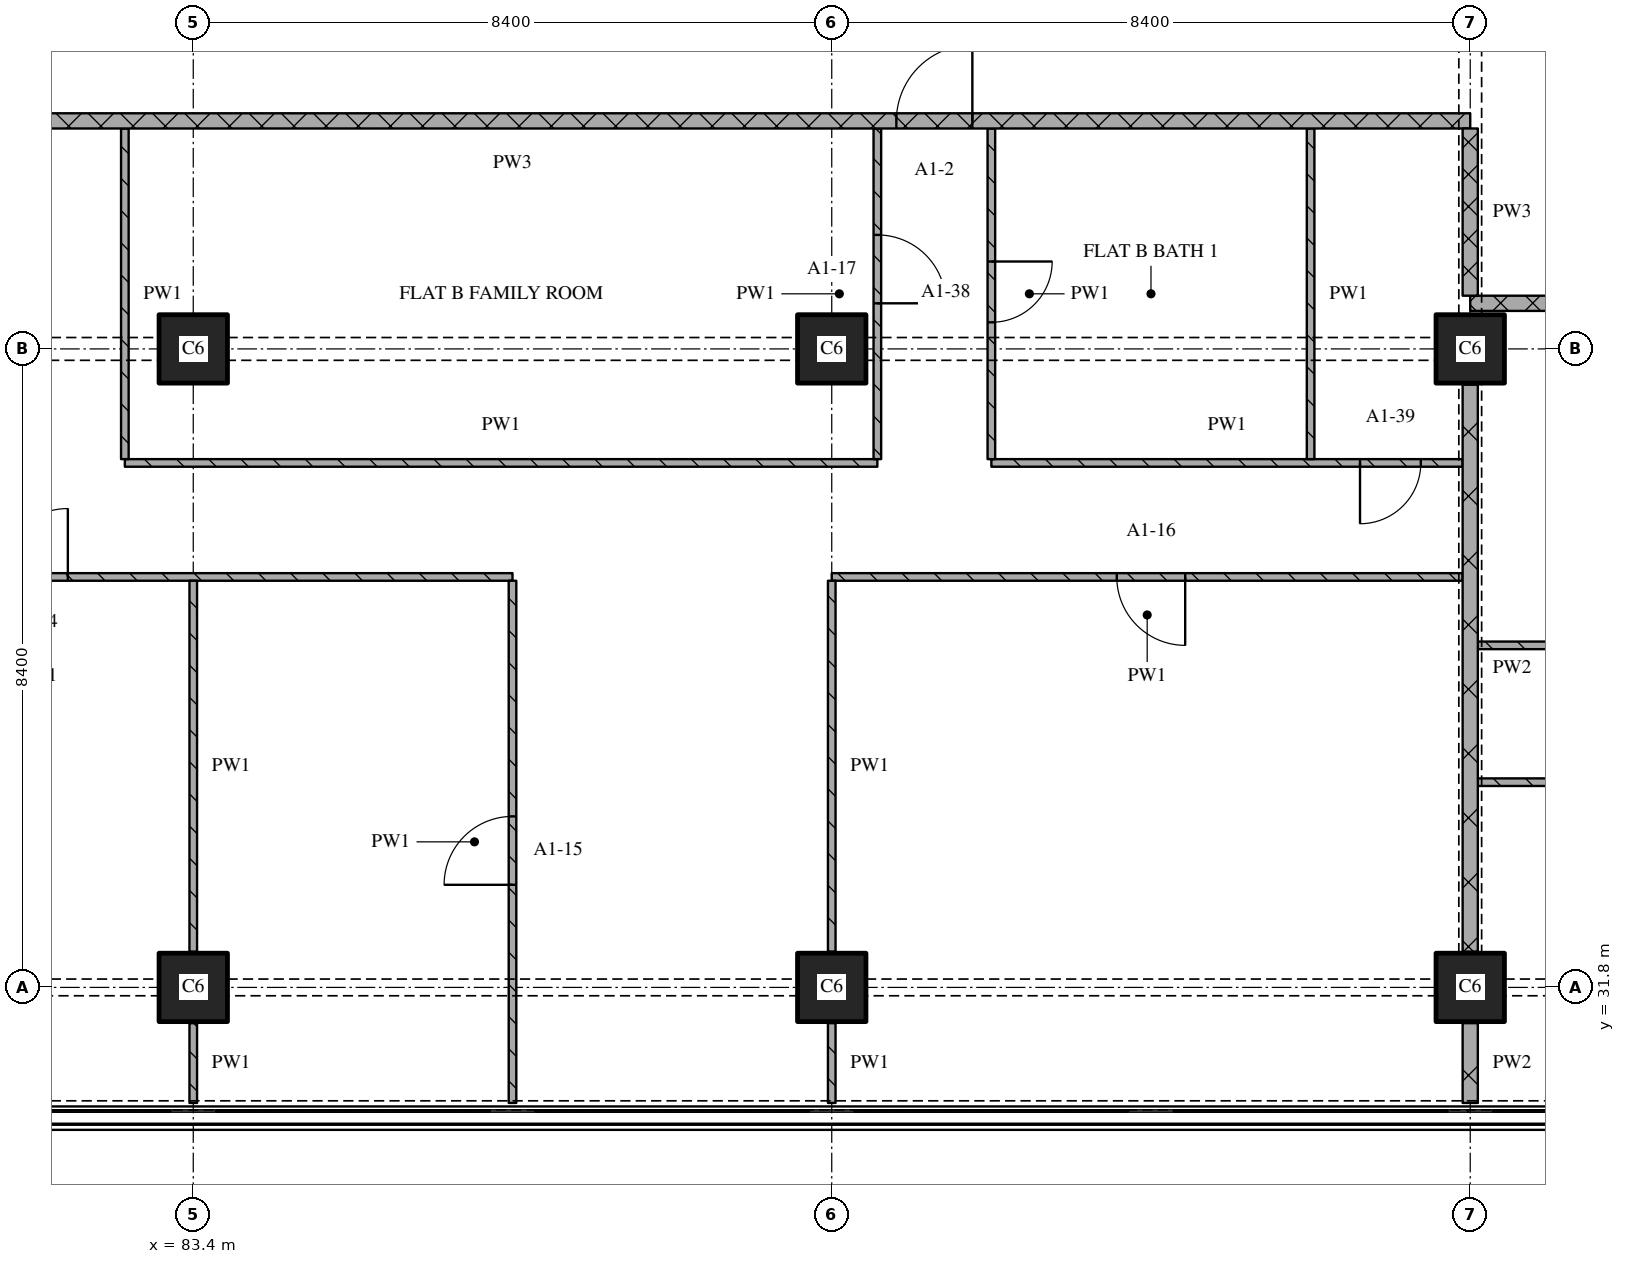
"""IFC4 building model, lengths in metres.
Left out: names, types, materials, properties, quantities, classifications, styles, units other than length and angle.
Written with IfcOpenShell. Run it as: python <this file> out.ifc"""

import sys

from ifc_helpers import new_model, si_unit, direction, frame, frame_2d, origin, origin_2d, place, context, subcontext, project, spatial, rectangle, extrude, element, fill, save


model = new_model("IFC4")
c1 = context("Model", 3, precision=1e-05, world=origin(), true_north=direction((0.0, 1.0)))
c2 = subcontext(c1, "Body", "Model", "MODEL_VIEW")
j1 = project(units=[si_unit("LENGTHUNIT", "METRE"), si_unit("PLANEANGLEUNIT", "RADIAN")], contexts=[c1])
p1 = place(None, origin())
s1 = spatial("IfcSite", under=j1, at=p1, CompositionType="ELEMENT")
p2 = place(p1, origin())
s2 = spatial("IfcBuilding", under=s1, at=p2, CompositionType="ELEMENT")
p3 = place(p2, frame((0.0, 0.0, 44.4)))
s3 = spatial("IfcBuildingStorey", under=s2, at=p3, CompositionType="ELEMENT", Elevation=44.4)
for number, where, z_axis, x_axis in (
    (1, (83.4, 31.8, 0.0), (0.0, 0.0, 1.0), (1.0, 0.0, 0.0)),
    (2, (83.4, 40.2, 0.0), (0.0, 0.0, 1.0), (1.0, 0.0, 0.0)),
    (3, (91.8, 31.8, 0.0), (0.0, 0.0, 1.0), (1.0, 0.0, 0.0)),
    (4, (91.8, 40.2, 0.0), (0.0, 0.0, 1.0), (1.0, 0.0, 0.0)),
    (5, (100.2, 31.8, 0.0), (0.0, 0.0, 1.0), (1.0, 0.0, 0.0)),
    (6, (100.2, 40.2, 0.0), (0.0, 0.0, 1.0), (1.0, 0.0, 0.0)),
):
    element("IfcColumn", number, at=place(p3, frame(where, z_axis=z_axis, x_axis=x_axis)), inside=s3, PredefinedType="COLUMN", context=c2, shape_type="SweptSolid", body=[
        extrude(rectangle(XDim=0.9, YDim=0.9, at=origin_2d()), origin(), (0.0, 0.0, 1.0), 3.6),
    ])
p4 = place(p3, frame((117.0, 34.5, 0.0), z_axis=(0.0, 0.0, 1.0), x_axis=(-1.0, 0.0, 0.0)))
e7 = element("IfcWall", 7, at=p4, inside=s3, PredefinedType="PARTITIONING", context=c2, shape_type="SweptSolid", body=[
    extrude(rectangle(XDim=16.7, YDim=0.1, at=frame_2d((8.35, 0.0))), origin(), (0.0, 0.0, 1.0), 3.32),
])
p5 = place(p4, frame((12.15, 0.0, 0.0)))
e8 = element("IfcOpeningElement", 8, at=p5, cuts=e7, PredefinedType="OPENING", context=c2, shape_type="SweptSolid", body=[
    extrude(rectangle(XDim=0.9, YDim=2.1, at=frame_2d((0.45, 1.05))), frame((0.0, 0.06, 0.0), z_axis=(0.0, -1.0, 0.0), x_axis=(1.0, 0.0, 0.0)), (0.0, 0.0, 1.0), 0.12),
])
p6 = place(p3, frame((100.3, 36.3, 0.0), z_axis=(0.0, 0.0, 1.0), x_axis=(1.0, 0.0, 0.0)))
e9 = element("IfcWall", 9, at=p6, inside=s3, PredefinedType="PARTITIONING", context=c2, shape_type="SweptSolid", body=[
    extrude(rectangle(XDim=11.0, YDim=0.1, at=frame_2d((5.5, 0.0))), origin(), (0.0, 0.0, 1.0), 3.32),
])
p7 = place(p6, frame((1.75, 0.0, 0.0)))
e10 = element("IfcOpeningElement", 10, at=p7, cuts=e9, PredefinedType="OPENING", context=c2, shape_type="SweptSolid", body=[
    extrude(rectangle(XDim=0.8, YDim=2.1, at=frame_2d((0.4, 1.05))), frame((0.0, 0.06, 0.0), z_axis=(0.0, -1.0, 0.0), x_axis=(1.0, 0.0, 0.0)), (0.0, 0.0, 1.0), 0.12),
])
p8 = place(p6, frame((6.25, 0.0, 0.0)))
e11 = element("IfcOpeningElement", 11, at=p8, cuts=e9, PredefinedType="OPENING", context=c2, shape_type="SweptSolid", body=[
    extrude(rectangle(XDim=0.8, YDim=2.1, at=frame_2d((0.4, 1.05))), frame((0.0, 0.06, 0.0), z_axis=(0.0, -1.0, 0.0), x_axis=(1.0, 0.0, 0.0)), (0.0, 0.0, 1.0), 0.12),
])
p9 = place(p3, frame((87.6, 37.2, 0.0), z_axis=(0.0, 0.0, 1.0), x_axis=(-1.0, 0.0, 0.0)))
e12 = element("IfcWall", 12, at=p9, inside=s3, PredefinedType="PARTITIONING", context=c2, shape_type="SweptSolid", body=[
    extrude(rectangle(XDim=12.5, YDim=0.1, at=frame_2d((6.25, 0.0))), origin(), (0.0, 0.0, 1.0), 3.32),
])
p10 = place(p9, frame((5.85, 0.0, 0.0)))
e13 = element("IfcOpeningElement", 13, at=p10, cuts=e12, PredefinedType="OPENING", context=c2, shape_type="SweptSolid", body=[
    extrude(rectangle(XDim=0.9, YDim=2.1, at=frame_2d((0.45, 1.05))), frame((0.0, 0.06, 0.0), z_axis=(0.0, -1.0, 0.0), x_axis=(1.0, 0.0, 0.0)), (0.0, 0.0, 1.0), 0.12),
])
p11 = place(p9, frame((10.05, 0.0, 0.0)))
e14 = element("IfcOpeningElement", 14, at=p11, cuts=e12, PredefinedType="OPENING", context=c2, shape_type="SweptSolid", body=[
    extrude(rectangle(XDim=0.9, YDim=2.1, at=frame_2d((0.45, 1.05))), frame((0.0, 0.06, 0.0), z_axis=(0.0, -1.0, 0.0), x_axis=(1.0, 0.0, 0.0)), (0.0, 0.0, 1.0), 0.12),
])
p12 = place(p3, frame((100.1, 37.2, 0.0), z_axis=(0.0, 0.0, 1.0), x_axis=(-1.0, 0.0, 0.0)))
e15 = element("IfcWall", 15, at=p12, inside=s3, PredefinedType="PARTITIONING", context=c2, shape_type="SweptSolid", body=[
    extrude(rectangle(XDim=8.3, YDim=0.1, at=frame_2d((4.15, 0.0))), origin(), (0.0, 0.0, 1.0), 3.32),
])
p13 = place(p12, frame((3.65, 0.0, 0.0)))
e16 = element("IfcOpeningElement", 16, at=p13, cuts=e15, PredefinedType="OPENING", context=c2, shape_type="SweptSolid", body=[
    extrude(rectangle(XDim=0.9, YDim=2.1, at=frame_2d((0.45, 1.05))), frame((0.0, 0.06, 0.0), z_axis=(0.0, -1.0, 0.0), x_axis=(1.0, 0.0, 0.0)), (0.0, 0.0, 1.0), 0.12),
])
p14 = place(p3, frame((82.5, 38.7, 0.0), z_axis=(0.0, 0.0, 1.0), x_axis=(1.0, 0.0, 0.0)))
e17 = element("IfcWall", 17, at=p14, inside=s3, PredefinedType="PARTITIONING", context=c2, shape_type="SweptSolid", body=[
    extrude(rectangle(XDim=9.9, YDim=0.1, at=frame_2d((4.95, 0.0))), origin(), (0.0, 0.0, 1.0), 3.32),
])
p15 = place(p3, frame((93.9, 38.7, 0.0), z_axis=(0.0, 0.0, 1.0), x_axis=(1.0, 0.0, 0.0)))
e18 = element("IfcWall", 18, at=p15, inside=s3, PredefinedType="PARTITIONING", context=c2, shape_type="SweptSolid", body=[
    extrude(rectangle(XDim=6.2, YDim=0.1, at=frame_2d((3.1, 0.0))), origin(), (0.0, 0.0, 1.0), 3.32),
])
p16 = place(p15, frame((4.85, 0.0, 0.0)))
e19 = element("IfcOpeningElement", 19, at=p16, cuts=e18, PredefinedType="OPENING", context=c2, shape_type="SweptSolid", body=[
    extrude(rectangle(XDim=0.8, YDim=2.1, at=frame_2d((0.4, 1.05))), frame((0.0, 0.06, 0.0), z_axis=(0.0, -1.0, 0.0), x_axis=(1.0, 0.0, 0.0)), (0.0, 0.0, 1.0), 0.12),
])
p17 = place(p3, frame((124.28, 40.8, 0.0), z_axis=(0.0, 0.0, 1.0), x_axis=(-1.0, 0.0, 0.0)))
e20 = element("IfcWall", 20, at=p17, inside=s3, PredefinedType="PARTITIONING", context=c2, shape_type="SweptSolid", body=[
    extrude(rectangle(XDim=24.08, YDim=0.2, at=frame_2d((12.04, 0.0))), origin(), (0.0, 0.0, 1.0), 3.32),
])
p18 = place(p17, frame((11.73, 0.0, 0.0)))
e21 = element("IfcOpeningElement", 21, at=p18, cuts=e20, PredefinedType="OPENING", context=c2, shape_type="SweptSolid", body=[
    extrude(rectangle(XDim=1.0, YDim=2.1, at=frame_2d((0.5, 1.05))), frame((0.0, 0.11, 0.0), z_axis=(0.0, -1.0, 0.0), x_axis=(1.0, 0.0, 0.0)), (0.0, 0.0, 1.0), 0.22),
])
p19 = place(p3, frame((100.2, 43.2, 0.0), z_axis=(0.0, 0.0, 1.0), x_axis=(-1.0, 0.0, 0.0)))
e22 = element("IfcWall", 22, at=p19, inside=s3, PredefinedType="PARTITIONING", context=c2, shape_type="SweptSolid", body=[
    extrude(rectangle(XDim=25.2, YDim=0.2, at=frame_2d((12.6, 0.0))), origin(), (0.0, 0.0, 1.0), 3.32),
])
p20 = place(p19, frame((6.55, 0.0, 0.0)))
e23 = element("IfcOpeningElement", 23, at=p20, cuts=e22, PredefinedType="OPENING", context=c2, shape_type="SweptSolid", body=[
    extrude(rectangle(XDim=1.0, YDim=2.1, at=frame_2d((0.5, 1.05))), frame((0.0, 0.11, 0.0), z_axis=(0.0, -1.0, 0.0), x_axis=(1.0, 0.0, 0.0)), (0.0, 0.0, 1.0), 0.22),
])
p21 = place(p3, frame((82.5, 43.1, 0.0), z_axis=(0.0, 0.0, 1.0), x_axis=(0.0, -1.0, 0.0)))
e24 = element("IfcWall", 24, at=p21, inside=s3, PredefinedType="PARTITIONING", context=c2, shape_type="SweptSolid", body=[
    extrude(rectangle(XDim=4.35, YDim=0.1, at=frame_2d((2.175, 0.0))), origin(), (0.0, 0.0, 1.0), 3.32),
])
p22 = place(p3, frame((83.4, 31.33, 0.0), z_axis=(0.0, 0.0, 1.0), x_axis=(0.0, -1.0, 0.0)))
e25 = element("IfcWall", 25, at=p22, inside=s3, PredefinedType="PARTITIONING", context=c2, shape_type="SweptSolid", body=[
    extrude(rectangle(XDim=1.05, YDim=0.1, at=frame_2d((0.525, 0.0))), origin(), (0.0, 0.0, 1.0), 3.32),
])
p23 = place(p3, frame((83.4, 37.15, 0.0), z_axis=(0.0, 0.0, 1.0), x_axis=(0.0, -1.0, 0.0)))
e26 = element("IfcWall", 26, at=p23, inside=s3, PredefinedType="PARTITIONING", context=c2, shape_type="SweptSolid", body=[
    extrude(rectangle(XDim=4.88, YDim=0.1, at=frame_2d((2.44, 0.0))), origin(), (0.0, 0.0, 1.0), 3.32),
])
p24 = place(p3, frame((87.6, 30.28, 0.0), z_axis=(0.0, 0.0, 1.0), x_axis=(0.0, 1.0, 0.0)))
e27 = element("IfcWall", 27, at=p24, inside=s3, PredefinedType="PARTITIONING", context=c2, shape_type="SweptSolid", body=[
    extrude(rectangle(XDim=6.87, YDim=0.1, at=frame_2d((3.435, 0.0))), origin(), (0.0, 0.0, 1.0), 3.32),
])
p25 = place(p24, frame((2.87, 0.0, 0.0)))
e28 = element("IfcOpeningElement", 28, at=p25, cuts=e27, PredefinedType="OPENING", context=c2, shape_type="SweptSolid", body=[
    extrude(rectangle(XDim=0.9, YDim=2.1, at=frame_2d((0.45, 1.05))), frame((0.0, 0.06, 0.0), z_axis=(0.0, -1.0, 0.0), x_axis=(1.0, 0.0, 0.0)), (0.0, 0.0, 1.0), 0.12),
])
p26 = place(p3, frame((91.8, 31.33, 0.0), z_axis=(0.0, 0.0, 1.0), x_axis=(0.0, -1.0, 0.0)))
e29 = element("IfcWall", 29, at=p26, inside=s3, PredefinedType="PARTITIONING", context=c2, shape_type="SweptSolid", body=[
    extrude(rectangle(XDim=1.05, YDim=0.1, at=frame_2d((0.525, 0.0))), origin(), (0.0, 0.0, 1.0), 3.32),
])
p27 = place(p3, frame((91.8, 37.15, 0.0), z_axis=(0.0, 0.0, 1.0), x_axis=(0.0, -1.0, 0.0)))
e30 = element("IfcWall", 30, at=p27, inside=s3, PredefinedType="PARTITIONING", context=c2, shape_type="SweptSolid", body=[
    extrude(rectangle(XDim=4.88, YDim=0.1, at=frame_2d((2.44, 0.0))), origin(), (0.0, 0.0, 1.0), 3.32),
])
p28 = place(p3, frame((92.4, 38.75, 0.0), z_axis=(0.0, 0.0, 1.0), x_axis=(0.0, 1.0, 0.0)))
e31 = element("IfcWall", 31, at=p28, inside=s3, PredefinedType="PARTITIONING", context=c2, shape_type="SweptSolid", body=[
    extrude(rectangle(XDim=4.35, YDim=0.1, at=frame_2d((2.175, 0.0))), origin(), (0.0, 0.0, 1.0), 3.32),
])
p29 = place(p28, frame((2.05, 0.0, 0.0)))
e32 = element("IfcOpeningElement", 32, at=p29, cuts=e31, PredefinedType="OPENING", context=c2, shape_type="SweptSolid", body=[
    extrude(rectangle(XDim=0.9, YDim=2.1, at=frame_2d((0.45, 1.05))), frame((0.0, 0.06, 0.0), z_axis=(0.0, -1.0, 0.0), x_axis=(1.0, 0.0, 0.0)), (0.0, 0.0, 1.0), 0.12),
])
p30 = place(p3, frame((93.9, 43.1, 0.0), z_axis=(0.0, 0.0, 1.0), x_axis=(0.0, -1.0, 0.0)))
e33 = element("IfcWall", 33, at=p30, inside=s3, PredefinedType="PARTITIONING", context=c2, shape_type="SweptSolid", body=[
    extrude(rectangle(XDim=4.35, YDim=0.1, at=frame_2d((2.175, 0.0))), origin(), (0.0, 0.0, 1.0), 3.32),
])
p31 = place(p30, frame((1.75, 0.0, 0.0)))
e34 = element("IfcOpeningElement", 34, at=p31, cuts=e33, PredefinedType="OPENING", context=c2, shape_type="SweptSolid", body=[
    extrude(rectangle(XDim=0.8, YDim=2.1, at=frame_2d((0.4, 1.05))), frame((0.0, 0.06, 0.0), z_axis=(0.0, -1.0, 0.0), x_axis=(1.0, 0.0, 0.0)), (0.0, 0.0, 1.0), 0.12),
])
p32 = place(p3, frame((98.1, 43.1, 0.0), z_axis=(0.0, 0.0, 1.0), x_axis=(0.0, -1.0, 0.0)))
e35 = element("IfcWall", 35, at=p32, inside=s3, PredefinedType="PARTITIONING", context=c2, shape_type="SweptSolid", body=[
    extrude(rectangle(XDim=4.35, YDim=0.1, at=frame_2d((2.175, 0.0))), origin(), (0.0, 0.0, 1.0), 3.32),
])
p33 = place(p3, frame((100.2, 43.1, 0.0), z_axis=(0.0, 0.0, 1.0), x_axis=(0.0, -1.0, 0.0)))
e36 = element("IfcWall", 36, at=p33, inside=s3, PredefinedType="PARTITIONING", context=c2, shape_type="SweptSolid", body=[
    extrude(rectangle(XDim=2.2, YDim=0.2, at=frame_2d((1.1, 0.0))), origin(), (0.0, 0.0, 1.0), 2.43),
])
p34 = place(p3, frame((100.2, 31.33, 0.0), z_axis=(0.0, 0.0, 1.0), x_axis=(0.0, -1.0, 0.0)))
e37 = element("IfcWall", 37, at=p34, inside=s3, PredefinedType="PARTITIONING", context=c2, shape_type="SweptSolid", body=[
    extrude(rectangle(XDim=1.05, YDim=0.2, at=frame_2d((0.525, 0.0))), origin(), (0.0, 0.0, 1.0), 3.32),
])
p35 = place(p3, frame((100.2, 39.73, 0.0), z_axis=(0.0, 0.0, 1.0), x_axis=(0.0, -1.0, 0.0)))
e38 = element("IfcWall", 38, at=p35, inside=s3, PredefinedType="PARTITIONING", context=c2, shape_type="SweptSolid", body=[
    extrude(rectangle(XDim=7.46, YDim=0.2, at=frame_2d((3.73, 0.0))), origin(), (0.0, 0.0, 1.0), 2.83),
])
p36 = place(p10, origin())
e39 = element("IfcDoor", 39, at=p36, inside=s3, OperationType="SINGLE_SWING_RIGHT", PredefinedType="DOOR", context=c2, shape_type="SweptSolid", body=[
    extrude(rectangle(XDim=0.9, YDim=2.1, at=frame_2d((0.45, 1.05))), frame((0.0, 0.025, 0.0), z_axis=(0.0, -1.0, 0.0), x_axis=(1.0, 0.0, 0.0)), (0.0, 0.0, 1.0), 0.05),
])
fill(e13, e39)
p37 = place(p13, origin())
e40 = element("IfcDoor", 40, at=p37, inside=s3, OperationType="SINGLE_SWING_LEFT", PredefinedType="DOOR", context=c2, shape_type="SweptSolid", body=[
    extrude(rectangle(XDim=0.9, YDim=2.1, at=frame_2d((0.45, 1.05))), frame((0.0, 0.025, 0.0), z_axis=(0.0, -1.0, 0.0), x_axis=(1.0, 0.0, 0.0)), (0.0, 0.0, 1.0), 0.05),
])
fill(e16, e40)
p38 = place(p16, origin())
e41 = element("IfcDoor", 41, at=p38, inside=s3, OperationType="SINGLE_SWING_RIGHT", PredefinedType="DOOR", context=c2, shape_type="SweptSolid", body=[
    extrude(rectangle(XDim=0.8, YDim=2.1, at=frame_2d((0.4, 1.05))), frame((0.0, 0.025, 0.0), z_axis=(0.0, -1.0, 0.0), x_axis=(1.0, 0.0, 0.0)), (0.0, 0.0, 1.0), 0.05),
])
fill(e19, e41)
p39 = place(p20, origin())
e42 = element("IfcDoor", 42, at=p39, inside=s3, OperationType="SINGLE_SWING_RIGHT", PredefinedType="DOOR", context=c2, shape_type="SweptSolid", body=[
    extrude(rectangle(XDim=1.0, YDim=2.1, at=frame_2d((0.5, 1.05))), frame((0.0, 0.025, 0.0), z_axis=(0.0, -1.0, 0.0), x_axis=(1.0, 0.0, 0.0)), (0.0, 0.0, 1.0), 0.05),
])
fill(e23, e42)
p40 = place(p25, origin())
e43 = element("IfcDoor", 43, at=p40, inside=s3, OperationType="SINGLE_SWING_LEFT", PredefinedType="DOOR", context=c2, shape_type="SweptSolid", body=[
    extrude(rectangle(XDim=0.9, YDim=2.1, at=frame_2d((0.45, 1.05))), frame((0.0, 0.025, 0.0), z_axis=(0.0, -1.0, 0.0), x_axis=(1.0, 0.0, 0.0)), (0.0, 0.0, 1.0), 0.05),
])
fill(e28, e43)
p41 = place(p29, origin())
e44 = element("IfcDoor", 44, at=p41, inside=s3, OperationType="SINGLE_SWING_RIGHT", PredefinedType="DOOR", context=c2, shape_type="SweptSolid", body=[
    extrude(rectangle(XDim=0.9, YDim=2.1, at=frame_2d((0.45, 1.05))), frame((0.0, 0.025, 0.0), z_axis=(0.0, -1.0, 0.0), x_axis=(1.0, 0.0, 0.0)), (0.0, 0.0, 1.0), 0.05),
])
fill(e32, e44)
p42 = place(p31, origin())
e45 = element("IfcDoor", 45, at=p42, inside=s3, OperationType="SINGLE_SWING_LEFT", PredefinedType="DOOR", context=c2, shape_type="SweptSolid", body=[
    extrude(rectangle(XDim=0.8, YDim=2.1, at=frame_2d((0.4, 1.05))), frame((0.0, 0.025, 0.0), z_axis=(0.0, -1.0, 0.0), x_axis=(1.0, 0.0, 0.0)), (0.0, 0.0, 1.0), 0.05),
])
fill(e34, e45)
save(model, sys.argv[1])
